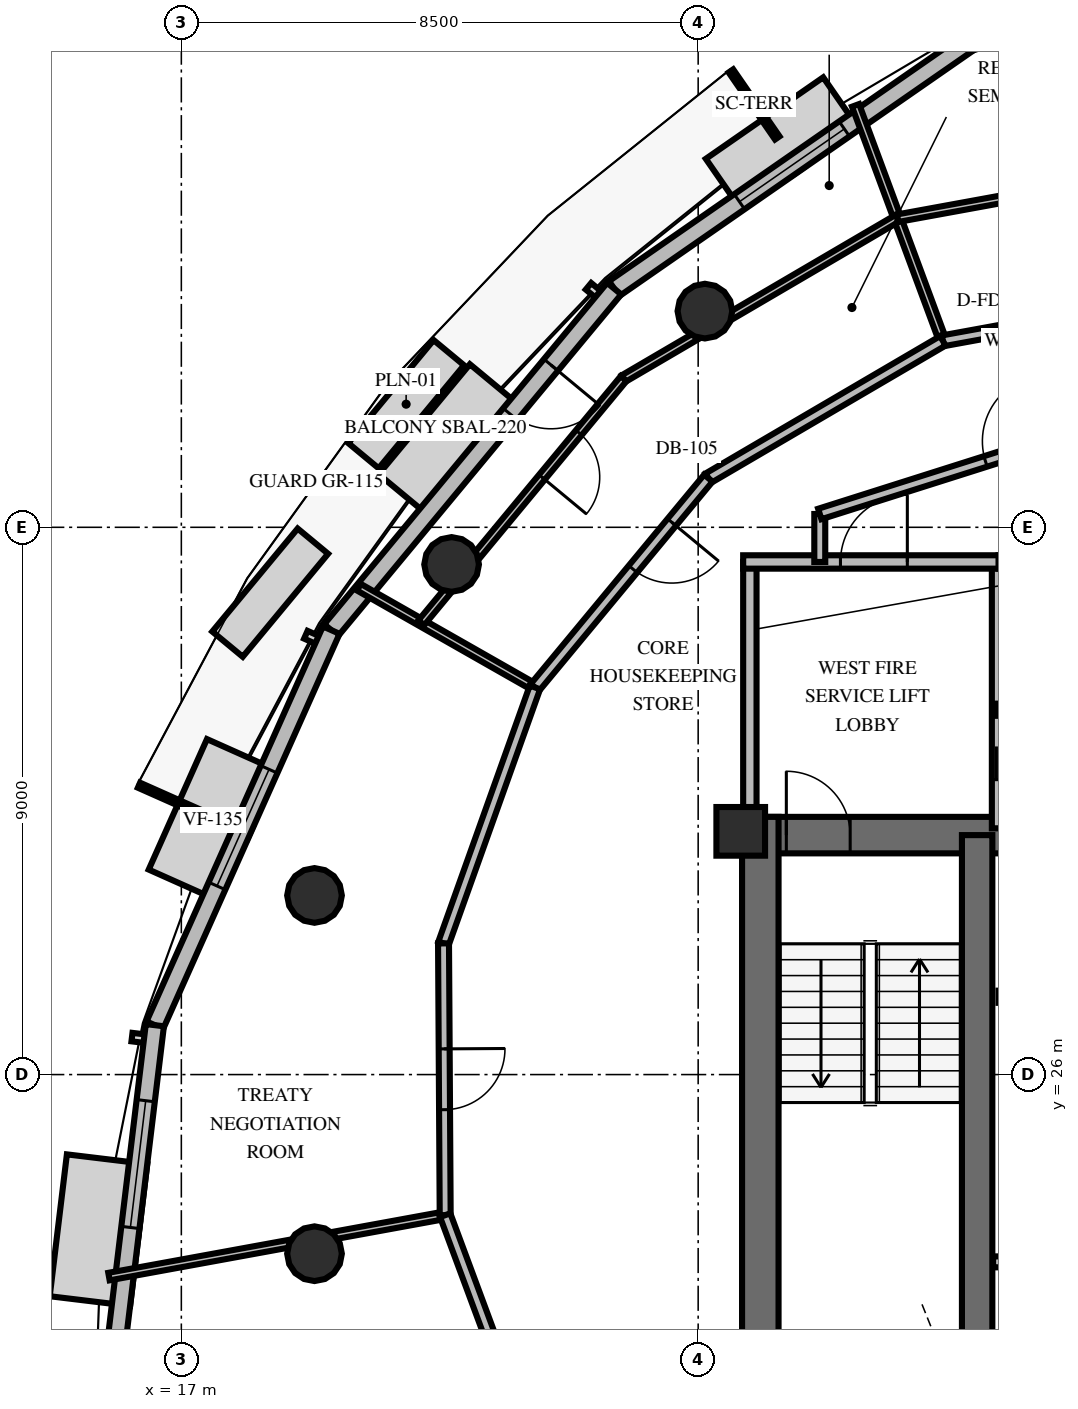
"""IFC4 building model, lengths in metres.
Left out: names, types, materials, properties, quantities, classifications, styles, units other than length and angle.
Written with IfcOpenShell. Run it as: python <this file> out.ifc"""

import sys

from ifc_helpers import new_model, si_unit, direction, frame, frame_2d, origin, origin_2d, place, context, subcontext, project, spatial, rectangle, circle, extrude, element, fill, save


model = new_model("IFC4")
c1 = context("Model", 3, precision=1e-05, world=origin(), true_north=direction((0.0, 1.0)))
c2 = subcontext(c1, "Body", "Model", "MODEL_VIEW")
j1 = project(units=[si_unit("LENGTHUNIT", "METRE"), si_unit("PLANEANGLEUNIT", "RADIAN")], contexts=[c1])
p1 = place(None, origin())
s1 = spatial("IfcSite", under=j1, at=p1, CompositionType="ELEMENT")
p2 = place(p1, origin())
s2 = spatial("IfcBuilding", under=s1, at=p2, CompositionType="ELEMENT")
p3 = place(p2, frame((0.0, 0.0, 241.2)))
s3 = spatial("IfcBuildingStorey", under=s2, at=p3, CompositionType="ELEMENT", Elevation=241.2)
p4 = place(p3, frame((26.222, 29.938, 0.0), z_axis=(0.0, 0.0, 1.0), x_axis=(1.0, 0.0, 0.0)))
e1 = element("IfcWall", 1, at=p4, inside=s3, PredefinedType="SHEAR", context=c2, shape_type="SweptSolid", body=[
    extrude(rectangle(XDim=15.566, YDim=0.6, at=frame_2d((7.783, 0.0))), origin(), (0.0, 0.0, 1.0), 3.6),
])
p5 = place(p4, frame((0.728, 0.0, 0.0)))
e2 = element("IfcOpeningElement", 2, at=p5, cuts=e1, PredefinedType="OPENING", context=c2, shape_type="SweptSolid", body=[
    extrude(rectangle(XDim=1.05, YDim=2.15, at=frame_2d((0.525, 1.075))), frame((0.0, 0.31, 0.0), z_axis=(0.0, -1.0, 0.0), x_axis=(1.0, 0.0, 0.0)), (0.0, 0.0, 1.0), 0.62),
])
p6 = place(p4, frame((13.778, 0.0, 0.0)))
e3 = element("IfcOpeningElement", 3, at=p6, cuts=e1, PredefinedType="OPENING", context=c2, shape_type="SweptSolid", body=[
    extrude(rectangle(XDim=1.05, YDim=2.15, at=frame_2d((0.525, 1.075))), frame((0.0, 0.31, 0.0), z_axis=(0.0, -1.0, 0.0), x_axis=(1.0, 0.0, 0.0)), (0.0, 0.0, 1.0), 0.62),
])
p7 = place(p4, frame((7.228, 0.0, 0.0)))
e4 = element("IfcOpeningElement", 4, at=p7, cuts=e1, PredefinedType="OPENING", context=c2, shape_type="SweptSolid", body=[
    extrude(rectangle(XDim=1.1, YDim=2.15, at=frame_2d((0.55, 1.075))), frame((0.0, 0.31, 0.0), z_axis=(0.0, -1.0, 0.0), x_axis=(1.0, 0.0, 0.0)), (0.0, 0.0, 1.0), 0.62),
])
p8 = place(p3, frame((26.522, 19.962, 0.0), z_axis=(0.0, 0.0, 1.0), x_axis=(0.0, 1.0, 0.0)))
e5 = element("IfcWall", 5, at=p8, inside=s3, PredefinedType="SHEAR", context=c2, shape_type="SweptSolid", body=[
    extrude(rectangle(XDim=10.276, YDim=0.6, at=frame_2d((5.138, 0.0))), origin(), (0.0, 0.0, 1.0), 3.6),
])
p9 = place(p3, frame((30.088, 20.262, 0.0), z_axis=(0.0, 0.0, 1.0), x_axis=(0.0, 1.0, 0.0)))
e6 = element("IfcWall", 6, at=p9, inside=s3, PredefinedType="SHEAR", context=c2, shape_type="SweptSolid", body=[
    extrude(rectangle(XDim=9.676, YDim=0.5, at=frame_2d((4.838, 0.0))), origin(), (0.0, 0.0, 1.0), 3.6),
])
p10 = place(p3, frame((26.2, 30.0, 0.0), z_axis=(0.0, 0.0, 1.0), x_axis=(1.0, 0.0, 0.0)))
e7 = element("IfcColumn", 7, at=p10, inside=s3, PredefinedType="PILASTER", context=c2, shape_type="SweptSolid", body=[
    extrude(rectangle(XDim=0.8, YDim=0.8, at=origin_2d()), origin(), (0.0, 0.0, 1.0), 3.6),
])
for number, where, z_axis, x_axis in (
    (8, (25.611, 38.555, 0.0), (0.0, 0.0, 1.0), (1.0, 0.0, 0.0)),
    (9, (21.445, 34.389, 0.0), (0.0, 0.0, 1.0), (1.0, 0.0, 0.0)),
    (10, (19.19, 28.946, 0.0), (0.0, 0.0, 1.0), (1.0, 0.0, 0.0)),
    (11, (19.19, 23.054, 0.0), (0.0, 0.0, 1.0), (1.0, 0.0, 0.0)),
):
    element("IfcColumn", number, at=place(p3, frame(where, z_axis=z_axis, x_axis=x_axis)), inside=s3, PredefinedType="COLUMN", context=c2, shape_type="SweptSolid", body=[
        extrude(circle(Radius=0.45, at=origin_2d()), origin(), (0.0, 0.0, 1.0), 3.6),
    ])
p11 = place(p3, frame((29.965, 42.981, 0.0), z_axis=(0.0, 0.0, 1.0), x_axis=(-0.821575322213, -0.570099982399, 0.0)))
e12 = element("IfcWall", 12, at=p11, inside=s3, PredefinedType="SOLIDWALL", context=c2, shape_type="SweptSolid", body=[
    extrude(rectangle(XDim=7.115, YDim=0.3, at=frame_2d((3.558, 0.0))), origin(), (0.0, 0.0, 1.0), 2.76),
])
p12 = place(p11, frame((2.508, 0.0, 0.8)))
e13 = element("IfcOpeningElement", 13, at=p12, cuts=e12, PredefinedType="OPENING", context=c2, shape_type="SweptSolid", body=[
    extrude(rectangle(XDim=2.1, YDim=1.85, at=frame_2d((1.05, 0.925))), frame((0.0, 0.16, 0.0), z_axis=(0.0, -1.0, 0.0), x_axis=(1.0, 0.0, 0.0)), (0.0, 0.0, 1.0), 0.32),
])
p13 = place(p3, frame((24.119, 38.925, 0.0), z_axis=(0.0, 0.0, 1.0), x_axis=(-0.638097821835, -0.769955303748, 0.0)))
e14 = element("IfcWall", 14, at=p13, inside=s3, PredefinedType="SOLIDWALL", context=c2, shape_type="SweptSolid", body=[
    extrude(rectangle(XDim=7.293, YDim=0.3, at=frame_2d((3.646, 0.0))), origin(), (0.0, 0.0, 1.0), 2.76),
])
p14 = place(p13, frame((1.63, 0.0, 0.0)))
e15 = element("IfcOpeningElement", 15, at=p14, cuts=e14, PredefinedType="OPENING", context=c2, shape_type="SweptSolid", body=[
    extrude(rectangle(XDim=1.05, YDim=2.15, at=frame_2d((0.525, 1.075))), frame((0.0, 0.16, 0.0), z_axis=(0.0, -1.0, 0.0), x_axis=(1.0, 0.0, 0.0)), (0.0, 0.0, 1.0), 0.32),
])
p15 = place(p3, frame((19.465, 33.31, 0.0), z_axis=(0.0, 0.0, 1.0), x_axis=(-0.407669232849, -0.913129671289, 0.0)))
e16 = element("IfcWall", 16, at=p15, inside=s3, PredefinedType="SOLIDWALL", context=c2, shape_type="SweptSolid", body=[
    extrude(rectangle(XDim=7.115, YDim=0.3, at=frame_2d((3.558, 0.0))), origin(), (0.0, 0.0, 1.0), 2.76),
])
p16 = place(p15, frame((2.508, 0.0, 0.8)))
e17 = element("IfcOpeningElement", 17, at=p16, cuts=e16, PredefinedType="OPENING", context=c2, shape_type="SweptSolid", body=[
    extrude(rectangle(XDim=2.1, YDim=1.85, at=frame_2d((1.05, 0.925))), frame((0.0, 0.16, 0.0), z_axis=(0.0, -1.0, 0.0), x_axis=(1.0, 0.0, 0.0)), (0.0, 0.0, 1.0), 0.32),
])
p17 = place(p3, frame((16.564, 26.812, 0.0), z_axis=(0.0, 0.0, 1.0), x_axis=(-0.120062472336, -0.992766338439, 0.0)))
e18 = element("IfcWall", 18, at=p17, inside=s3, PredefinedType="SOLIDWALL", context=c2, shape_type="SweptSolid", body=[
    extrude(rectangle(XDim=6.643, YDim=0.3, at=frame_2d((3.322, 0.0))), origin(), (0.0, 0.0, 1.0), 2.76),
])
p18 = place(p17, frame((1.251, 0.0, 0.8)))
e19 = element("IfcOpeningElement", 19, at=p18, cuts=e18, PredefinedType="OPENING", context=c2, shape_type="SweptSolid", body=[
    extrude(rectangle(XDim=2.1, YDim=1.85, at=frame_2d((1.05, 0.925))), frame((0.0, 0.16, 0.0), z_axis=(0.0, -1.0, 0.0), x_axis=(1.0, 0.0, 0.0)), (0.0, 0.0, 1.0), 0.32),
])
p19 = place(p3, frame((26.35, 30.05, 0.0), z_axis=(0.0, 0.0, 1.0), x_axis=(0.0, 1.0, 0.0)))
e20 = element("IfcWall", 20, at=p19, inside=s3, PredefinedType="SOLIDWALL", context=c2, shape_type="SweptSolid", body=[
    extrude(rectangle(XDim=4.38, YDim=0.22, at=frame_2d((2.19, 0.0))), origin(), (0.0, 0.0, 1.0), 2.46),
])
p20 = place(p3, frame((30.44, 30.05, 0.0), z_axis=(0.0, 0.0, 1.0), x_axis=(0.0, 1.0, 0.0)))
e21 = element("IfcWall", 21, at=p20, inside=s3, PredefinedType="SOLIDWALL", context=c2, shape_type="SweptSolid", body=[
    extrude(rectangle(XDim=4.38, YDim=0.22, at=frame_2d((2.19, 0.0))), origin(), (0.0, 0.0, 1.0), 2.46),
])
p21 = place(p20, frame((0.8, 0.0, 0.0)))
e22 = element("IfcOpeningElement", 22, at=p21, cuts=e21, PredefinedType="OPENING", context=c2, shape_type="SweptSolid", body=[
    extrude(rectangle(XDim=1.05, YDim=2.1, at=frame_2d((0.525, 1.05))), frame((0.0, 0.12, 0.0), z_axis=(0.0, -1.0, 0.0), x_axis=(1.0, 0.0, 0.0)), (0.0, 0.0, 1.0), 0.24),
])
p22 = place(p3, frame((26.24, 34.43, 0.0), z_axis=(0.0, 0.0, 1.0), x_axis=(1.0, 0.0, 0.0)))
e23 = element("IfcWall", 23, at=p22, inside=s3, PredefinedType="SOLIDWALL", context=c2, shape_type="SweptSolid", body=[
    extrude(rectangle(XDim=4.31, YDim=0.22, at=frame_2d((2.155, 0.0))), origin(), (0.0, 0.0, 1.0), 2.46),
])
p23 = place(p22, frame((1.6, 0.0, 0.0)))
e24 = element("IfcOpeningElement", 24, at=p23, cuts=e23, PredefinedType="OPENING", context=c2, shape_type="SweptSolid", body=[
    extrude(rectangle(XDim=1.1, YDim=2.15, at=frame_2d((0.55, 1.075))), frame((0.0, 0.12, 0.0), z_axis=(0.0, -1.0, 0.0), x_axis=(1.0, 0.0, 0.0)), (0.0, 0.0, 1.0), 0.24),
])
p24 = place(p3, frame((30.4, 32.0, 0.0), z_axis=(0.0, 0.0, 1.0), x_axis=(1.0, 0.0, 0.0)))
e25 = element("IfcWall", 25, at=p24, inside=s3, PredefinedType="SOLIDWALL", context=c2, shape_type="SweptSolid", body=[
    extrude(rectangle(XDim=2.55, YDim=0.2, at=frame_2d((1.275, 0.0))), origin(), (0.0, 0.0, 1.0), 2.46),
])
p25 = place(p3, frame((30.35, 22.92, 0.0), z_axis=(0.0, 0.0, 1.0), x_axis=(1.0, 0.0, 0.0)))
e26 = element("IfcWall", 26, at=p25, inside=s3, PredefinedType="PARTITIONING", context=c2, shape_type="SweptSolid", body=[
    extrude(rectangle(XDim=7.3, YDim=0.18, at=frame_2d((3.65, 0.0))), origin(), (0.0, 0.0, 1.0), 2.46),
])
p26 = place(p25, frame((1.3, 0.0, 0.0)))
e27 = element("IfcOpeningElement", 27, at=p26, cuts=e26, PredefinedType="OPENING", context=c2, shape_type="SweptSolid", body=[
    extrude(rectangle(XDim=1.0, YDim=2.15, at=frame_2d((0.5, 1.075))), frame((0.0, 0.1, 0.0), z_axis=(0.0, -1.0, 0.0), x_axis=(1.0, 0.0, 0.0)), (0.0, 0.0, 1.0), 0.2),
])
p27 = place(p25, frame((5.05, 0.0, 0.0)))
e28 = element("IfcOpeningElement", 28, at=p27, cuts=e26, PredefinedType="OPENING", context=c2, shape_type="SweptSolid", body=[
    extrude(rectangle(XDim=1.0, YDim=2.15, at=frame_2d((0.5, 1.075))), frame((0.0, 0.1, 0.0), z_axis=(0.0, -1.0, 0.0), x_axis=(1.0, 0.0, 0.0)), (0.0, 0.0, 1.0), 0.2),
])
p28 = place(p3, frame((27.5, 34.43, 0.0), z_axis=(0.0, 0.0, 1.0), x_axis=(0.0, 1.0, 0.0)))
e29 = element("IfcWall", 29, at=p28, inside=s3, PredefinedType="PARTITIONING", context=c2, shape_type="SweptSolid", body=[
    extrude(rectangle(XDim=0.789, YDim=0.18, at=frame_2d((0.395, 0.0))), origin(), (0.0, 0.0, 1.0), 2.46),
])
p29 = place(p3, frame((27.5, 35.219, 0.0), z_axis=(0.0, 0.0, 1.0), x_axis=(0.953228121756, 0.302251795518, 0.0)))
e30 = element("IfcWall", 30, at=p29, inside=s3, PredefinedType="PARTITIONING", context=c2, shape_type="SweptSolid", body=[
    extrude(rectangle(XDim=6.819, YDim=0.18, at=frame_2d((3.409, 0.0))), origin(), (0.0, 0.0, 1.0), 2.46),
])
p30 = place(p29, frame((2.86, 0.0, 0.0)))
e31 = element("IfcOpeningElement", 31, at=p30, cuts=e30, PredefinedType="OPENING", context=c2, shape_type="SweptSolid", body=[
    extrude(rectangle(XDim=1.1, YDim=2.15, at=frame_2d((0.55, 1.075))), frame((0.0, 0.1, 0.0), z_axis=(0.0, -1.0, 0.0), x_axis=(1.0, 0.0, 0.0)), (0.0, 0.0, 1.0), 0.2),
])
p31 = place(p3, frame((29.524, 38.067, 0.0), z_axis=(0.0, 0.0, 1.0), x_axis=(-0.347726358712, 0.937596064122, 0.0)))
e32 = element("IfcWall", 32, at=p31, inside=s3, PredefinedType="PARTITIONING", context=c2, shape_type="SweptSolid", body=[
    extrude(rectangle(XDim=4.13, YDim=0.125, at=frame_2d((2.065, 0.0))), origin(), (0.0, 0.0, 1.0), 2.46),
])
p32 = place(p3, frame((33.921, 38.87, 0.0), z_axis=(0.0, 0.0, 1.0), x_axis=(-0.983721002142, -0.179702504, 0.0)))
e33 = element("IfcWall", 33, at=p32, inside=s3, PredefinedType="PARTITIONING", context=c2, shape_type="SweptSolid", body=[
    extrude(rectangle(XDim=4.47, YDim=0.18, at=frame_2d((2.235, 0.0))), origin(), (0.0, 0.0, 1.0), 2.46),
])
p33 = place(p3, frame((33.908, 41.02, 0.0), z_axis=(0.0, 0.0, 1.0), x_axis=(-0.983726569389, -0.179672025305, 0.0)))
e34 = element("IfcWall", 34, at=p33, inside=s3, PredefinedType="PARTITIONING", context=c2, shape_type="SweptSolid", body=[
    extrude(rectangle(XDim=5.217, YDim=0.125, at=frame_2d((2.608, 0.0))), origin(), (0.0, 0.0, 1.0), 2.46),
])
p34 = place(p3, frame((22.815, 32.367, 0.0), z_axis=(0.0, 0.0, 1.0), x_axis=(-0.86904485461, 0.494733302574, 0.0)))
e35 = element("IfcWall", 35, at=p34, inside=s3, PredefinedType="PARTITIONING", context=c2, shape_type="SweptSolid", body=[
    extrude(rectangle(XDim=3.331, YDim=0.125, at=frame_2d((1.666, 0.0))), origin(), (0.0, 0.0, 1.0), 2.46),
])
p35 = place(p3, frame((29.524, 38.067, 0.0), z_axis=(0.0, 0.0, 1.0), x_axis=(-0.862971485052, -0.505252625909, 0.0)))
e36 = element("IfcWall", 36, at=p35, inside=s3, PredefinedType="PARTITIONING", context=c2, shape_type="SweptSolid", body=[
    extrude(rectangle(XDim=4.47, YDim=0.18, at=frame_2d((2.235, 0.0))), origin(), (0.0, 0.0, 1.0), 2.46),
])
p36 = place(p3, frame((25.667, 35.808, 0.0), z_axis=(0.0, 0.0, 1.0), x_axis=(-0.638070606168, -0.769977857828, 0.0)))
e37 = element("IfcWall", 37, at=p36, inside=s3, PredefinedType="PARTITIONING", context=c2, shape_type="SweptSolid", body=[
    extrude(rectangle(XDim=4.47, YDim=0.18, at=frame_2d((2.235, 0.0))), origin(), (0.0, 0.0, 1.0), 2.46),
])
p37 = place(p36, frame((0.942, 0.0, 0.0)))
e38 = element("IfcOpeningElement", 38, at=p37, cuts=e37, PredefinedType="OPENING", context=c2, shape_type="SweptSolid", body=[
    extrude(rectangle(XDim=1.0, YDim=2.15, at=frame_2d((0.5, 1.075))), frame((0.0, 0.1, 0.0), z_axis=(0.0, -1.0, 0.0), x_axis=(1.0, 0.0, 0.0)), (0.0, 0.0, 1.0), 0.2),
])
p38 = place(p3, frame((28.777, 40.083, 0.0), z_axis=(0.0, 0.0, 1.0), x_axis=(-0.862952750204, -0.505284623668, 0.0)))
e39 = element("IfcWall", 39, at=p38, inside=s3, PredefinedType="PARTITIONING", context=c2, shape_type="SweptSolid", body=[
    extrude(rectangle(XDim=5.216, YDim=0.125, at=frame_2d((2.608, 0.0))), origin(), (0.0, 0.0, 1.0), 2.46),
])
p39 = place(p3, frame((24.275, 37.447, 0.0), z_axis=(0.0, 0.0, 1.0), x_axis=(-0.638078123437, -0.769971628303, 0.0)))
e40 = element("IfcWall", 40, at=p39, inside=s3, PredefinedType="PARTITIONING", context=c2, shape_type="SweptSolid", body=[
    extrude(rectangle(XDim=5.216, YDim=0.125, at=frame_2d((2.608, 0.0))), origin(), (0.0, 0.0, 1.0), 2.46),
])
p40 = place(p39, frame((1.156, 0.0, 0.0)))
e41 = element("IfcOpeningElement", 41, at=p40, cuts=e40, PredefinedType="OPENING", context=c2, shape_type="SweptSolid", body=[
    extrude(rectangle(XDim=0.95, YDim=2.15, at=frame_2d((0.475, 1.075))), frame((0.0, 0.073, 0.0), z_axis=(0.0, -1.0, 0.0), x_axis=(1.0, 0.0, 0.0)), (0.0, 0.0, 1.0), 0.145),
])
p41 = place(p3, frame((21.339, 23.688, 0.0), z_axis=(0.0, 0.0, 1.0), x_axis=(-0.983732020777, -0.179642175722, 0.0)))
e42 = element("IfcWall", 42, at=p41, inside=s3, PredefinedType="PARTITIONING", context=c2, shape_type="SweptSolid", body=[
    extrude(rectangle(XDim=5.621, YDim=0.125, at=frame_2d((2.811, 0.0))), origin(), (0.0, 0.0, 1.0), 2.46),
])
p42 = place(p3, frame((22.815, 32.367, 0.0), z_axis=(0.0, 0.0, 1.0), x_axis=(-0.336312175041, -0.941750561943, 0.0)))
e43 = element("IfcWall", 43, at=p42, inside=s3, PredefinedType="PARTITIONING", context=c2, shape_type="SweptSolid", body=[
    extrude(rectangle(XDim=4.469, YDim=0.18, at=frame_2d((2.235, 0.0))), origin(), (0.0, 0.0, 1.0), 2.46),
])
p43 = place(p3, frame((21.312, 28.157, 0.0), z_axis=(0.0, 0.0, 1.0), x_axis=(0.006117429774, -0.999981288351, 0.0)))
e44 = element("IfcWall", 44, at=p43, inside=s3, PredefinedType="PARTITIONING", context=c2, shape_type="SweptSolid", body=[
    extrude(rectangle(XDim=4.47, YDim=0.18, at=frame_2d((2.235, 0.0))), origin(), (0.0, 0.0, 1.0), 2.46),
])
p44 = place(p43, frame((1.735, 0.0, 0.0)))
e45 = element("IfcOpeningElement", 45, at=p44, cuts=e44, PredefinedType="OPENING", context=c2, shape_type="SweptSolid", body=[
    extrude(rectangle(XDim=1.0, YDim=2.15, at=frame_2d((0.5, 1.075))), frame((0.0, 0.1, 0.0), z_axis=(0.0, -1.0, 0.0), x_axis=(1.0, 0.0, 0.0)), (0.0, 0.0, 1.0), 0.2),
])
p45 = place(p3, frame((21.339, 23.688, 0.0), z_axis=(0.0, 0.0, 1.0), x_axis=(0.347775071594, -0.93757799653, 0.0)))
e46 = element("IfcWall", 46, at=p45, inside=s3, PredefinedType="PARTITIONING", context=c2, shape_type="SweptSolid", body=[
    extrude(rectangle(XDim=4.47, YDim=0.18, at=frame_2d((2.235, 0.0))), origin(), (0.0, 0.0, 1.0), 2.46),
])
p46 = place(p45, frame((2.527, 0.0, 0.0)))
e47 = element("IfcOpeningElement", 47, at=p46, cuts=e46, PredefinedType="OPENING", context=c2, shape_type="SweptSolid", body=[
    extrude(rectangle(XDim=1.0, YDim=2.15, at=frame_2d((0.5, 1.075))), frame((0.0, 0.1, 0.0), z_axis=(0.0, -1.0, 0.0), x_axis=(1.0, 0.0, 0.0)), (0.0, 0.0, 1.0), 0.2),
])
p47 = place(p12, origin())
e48 = element("IfcWindow", 48, at=p47, inside=s3, PartitioningType="SINGLE_PANEL", PredefinedType="WINDOW", context=c2, shape_type="SweptSolid", body=[
    extrude(rectangle(XDim=2.1, YDim=1.85, at=frame_2d((1.05, 0.925))), frame((0.0, 0.03, 0.0), z_axis=(0.0, -1.0, 0.0), x_axis=(1.0, 0.0, 0.0)), (0.0, 0.0, 1.0), 0.06),
])
fill(e13, e48)
p48 = place(p14, origin())
e49 = element("IfcDoor", 49, at=p48, inside=s3, OperationType="SINGLE_SWING_LEFT", PredefinedType="DOOR", context=c2, shape_type="SweptSolid", body=[
    extrude(rectangle(XDim=1.05, YDim=2.15, at=frame_2d((0.525, 1.075))), frame((0.0, 0.025, 0.0), z_axis=(0.0, -1.0, 0.0), x_axis=(1.0, 0.0, 0.0)), (0.0, 0.0, 1.0), 0.05),
])
fill(e15, e49)
p49 = place(p16, origin())
e50 = element("IfcWindow", 50, at=p49, inside=s3, PartitioningType="SINGLE_PANEL", PredefinedType="WINDOW", context=c2, shape_type="SweptSolid", body=[
    extrude(rectangle(XDim=2.1, YDim=1.85, at=frame_2d((1.05, 0.925))), frame((0.0, 0.03, 0.0), z_axis=(0.0, -1.0, 0.0), x_axis=(1.0, 0.0, 0.0)), (0.0, 0.0, 1.0), 0.06),
])
fill(e17, e50)
p50 = place(p18, origin())
e51 = element("IfcWindow", 51, at=p50, inside=s3, PartitioningType="SINGLE_PANEL", PredefinedType="WINDOW", context=c2, shape_type="SweptSolid", body=[
    extrude(rectangle(XDim=2.1, YDim=1.85, at=frame_2d((1.05, 0.925))), frame((0.0, 0.03, 0.0), z_axis=(0.0, -1.0, 0.0), x_axis=(1.0, 0.0, 0.0)), (0.0, 0.0, 1.0), 0.06),
])
fill(e19, e51)
p51 = place(p5, origin())
e52 = element("IfcDoor", 52, at=p51, inside=s3, OperationType="SINGLE_SWING_LEFT", PredefinedType="DOOR", context=c2, shape_type="SweptSolid", body=[
    extrude(rectangle(XDim=1.05, YDim=2.15, at=frame_2d((0.525, 1.075))), frame((0.0, 0.025, 0.0), z_axis=(0.0, -1.0, 0.0), x_axis=(1.0, 0.0, 0.0)), (0.0, 0.0, 1.0), 0.05),
])
fill(e2, e52)
p52 = place(p23, origin())
e53 = element("IfcDoor", 53, at=p52, inside=s3, OperationType="SINGLE_SWING_RIGHT", PredefinedType="DOOR", context=c2, shape_type="SweptSolid", body=[
    extrude(rectangle(XDim=1.1, YDim=2.15, at=frame_2d((0.55, 1.075))), frame((0.0, 0.025, 0.0), z_axis=(0.0, -1.0, 0.0), x_axis=(1.0, 0.0, 0.0)), (0.0, 0.0, 1.0), 0.05),
])
fill(e24, e53)
p53 = place(p21, origin())
e54 = element("IfcDoor", 54, at=p53, inside=s3, OperationType="DOUBLE_DOOR_SLIDING", PredefinedType="USERDEFINED", context=c2, shape_type="SweptSolid", body=[
    extrude(rectangle(XDim=1.05, YDim=2.1, at=frame_2d((0.525, 1.05))), frame((0.0, 0.025, 0.0), z_axis=(0.0, -1.0, 0.0), x_axis=(1.0, 0.0, 0.0)), (0.0, 0.0, 1.0), 0.05),
])
fill(e22, e54)
p54 = place(p30, origin())
e55 = element("IfcDoor", 55, at=p54, inside=s3, OperationType="SINGLE_SWING_RIGHT", PredefinedType="DOOR", context=c2, shape_type="SweptSolid", body=[
    extrude(rectangle(XDim=1.1, YDim=2.15, at=frame_2d((0.55, 1.075))), frame((0.0, 0.025, 0.0), z_axis=(0.0, -1.0, 0.0), x_axis=(1.0, 0.0, 0.0)), (0.0, 0.0, 1.0), 0.05),
])
fill(e31, e55)
p55 = place(p37, origin())
e56 = element("IfcDoor", 56, at=p55, inside=s3, OperationType="SINGLE_SWING_LEFT", PredefinedType="DOOR", context=c2, shape_type="SweptSolid", body=[
    extrude(rectangle(XDim=1.0, YDim=2.15, at=frame_2d((0.5, 1.075))), frame((0.0, 0.025, 0.0), z_axis=(0.0, -1.0, 0.0), x_axis=(1.0, 0.0, 0.0)), (0.0, 0.0, 1.0), 0.05),
])
fill(e38, e56)
p56 = place(p40, origin())
e57 = element("IfcDoor", 57, at=p56, inside=s3, OperationType="SINGLE_SWING_RIGHT", PredefinedType="DOOR", context=c2, shape_type="SweptSolid", body=[
    extrude(rectangle(XDim=0.95, YDim=2.15, at=frame_2d((0.475, 1.075))), frame((0.0, 0.025, 0.0), z_axis=(0.0, -1.0, 0.0), x_axis=(1.0, 0.0, 0.0)), (0.0, 0.0, 1.0), 0.05),
])
fill(e41, e57)
p57 = place(p44, origin())
e58 = element("IfcDoor", 58, at=p57, inside=s3, OperationType="SINGLE_SWING_LEFT", PredefinedType="DOOR", context=c2, shape_type="SweptSolid", body=[
    extrude(rectangle(XDim=1.0, YDim=2.15, at=frame_2d((0.5, 1.075))), frame((0.0, 0.025, 0.0), z_axis=(0.0, -1.0, 0.0), x_axis=(1.0, 0.0, 0.0)), (0.0, 0.0, 1.0), 0.05),
])
fill(e45, e58)
save(model, sys.argv[1])
